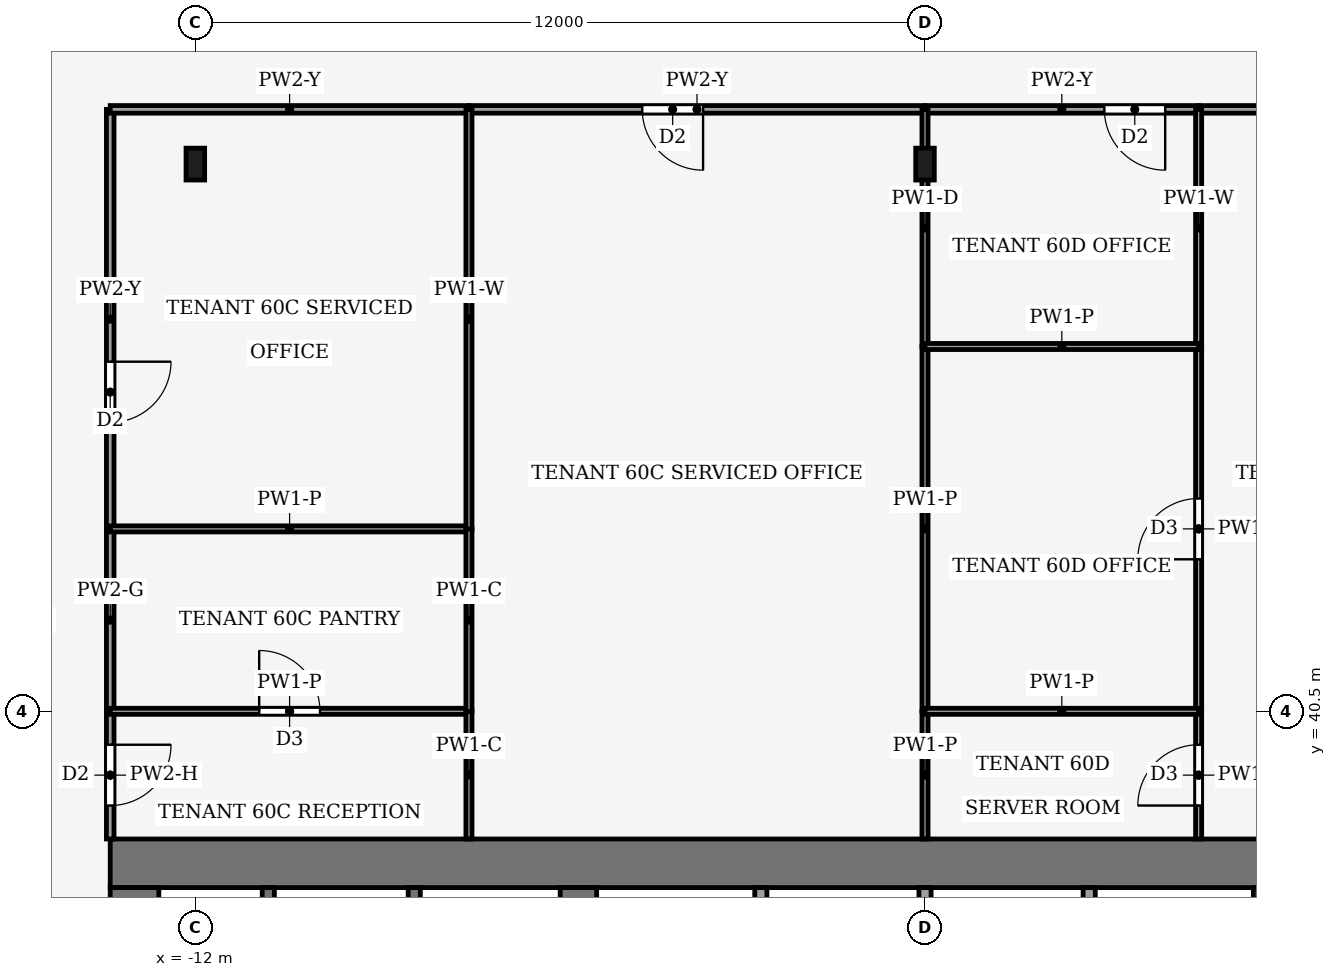
"""IFC4 building model, lengths in metres.
Left out: names, types, materials, properties, quantities, classifications, styles, units other than length and angle.
Written with IfcOpenShell. Run it as: python <this file> out.ifc"""

import sys

from ifc_helpers import new_model, si_unit, direction, frame, frame_2d, origin, origin_2d, place, context, subcontext, project, spatial, rectangle, i_section, extrude, element, fill, save


model = new_model("IFC4")
c1 = context("Model", 3, precision=1e-05, world=origin(), true_north=direction((0.0, 1.0)))
c2 = subcontext(c1, "Body", "Model", "MODEL_VIEW")
j1 = project(units=[si_unit("LENGTHUNIT", "METRE"), si_unit("PLANEANGLEUNIT", "RADIAN")], contexts=[c1])
p1 = place(None, origin())
s1 = spatial("IfcSite", under=j1, at=p1, CompositionType="ELEMENT")
p2 = place(p1, origin())
s2 = spatial("IfcBuilding", under=s1, at=p2, CompositionType="ELEMENT")
p3 = place(p2, frame((0.0, 0.0, 262.0)))
s3 = spatial("IfcBuildingStorey", under=s2, at=p3, CompositionType="ELEMENT", Elevation=262.0)
p4 = place(p3, frame((-13.4, 38.0, -0.13), z_axis=(0.0, 0.0, 1.0), x_axis=(1.0, 0.0, 0.0)))
e1 = element("IfcWall", 1, at=p4, inside=s3, PredefinedType="SHEAR", context=c2, shape_type="SweptSolid", body=[
    extrude(rectangle(XDim=26.8, YDim=0.8, at=frame_2d((13.4, 0.0))), origin(), (0.0, 0.0, 1.0), 4.0),
])
p5 = place(p3, frame((-13.0, 18.4, -0.13), z_axis=(0.0, 0.0, 1.0), x_axis=(0.0, 1.0, 0.0)))
e2 = element("IfcWall", 2, at=p5, inside=s3, PredefinedType="SHEAR", context=c2, shape_type="SweptSolid", body=[
    extrude(rectangle(XDim=19.2, YDim=0.8, at=frame_2d((9.6, 0.0))), origin(), (0.0, 0.0, 1.0), 4.0),
])
p6 = place(p5, frame((2.8, 0.0, 0.13)))
e3 = element("IfcOpeningElement", 3, at=p6, cuts=e2, PredefinedType="OPENING", context=c2, shape_type="SweptSolid", body=[
    extrude(rectangle(XDim=2.4, YDim=2.4, at=frame_2d((1.2, 1.2))), frame((0.0, 0.41, 0.0), z_axis=(0.0, -1.0, 0.0), x_axis=(1.0, 0.0, 0.0)), (0.0, 0.0, 1.0), 0.82),
])
p7 = place(p5, frame((13.4, 0.0, 0.13)))
e4 = element("IfcOpeningElement", 4, at=p7, cuts=e2, PredefinedType="OPENING", context=c2, shape_type="SweptSolid", body=[
    extrude(rectangle(XDim=1.4, YDim=2.2, at=frame_2d((0.7, 1.1))), frame((0.0, 0.41, 0.0), z_axis=(0.0, -1.0, 0.0), x_axis=(1.0, 0.0, 0.0)), (0.0, 0.0, 1.0), 0.82),
])
p8 = place(p3, frame((-5.7, 18.4, -0.13), z_axis=(0.0, 0.0, 1.0), x_axis=(0.0, 1.0, 0.0)))
e5 = element("IfcWall", 5, at=p8, inside=s3, PredefinedType="SHEAR", context=c2, shape_type="SweptSolid", body=[
    extrude(rectangle(XDim=19.2, YDim=0.6, at=frame_2d((9.6, 0.0))), origin(), (0.0, 0.0, 1.0), 4.0),
])
p9 = place(p8, frame((8.35, 0.0, 0.13)))
e6 = element("IfcOpeningElement", 6, at=p9, cuts=e5, PredefinedType="OPENING", context=c2, shape_type="SweptSolid", body=[
    extrude(rectangle(XDim=0.9, YDim=2.1, at=frame_2d((0.45, 1.05))), frame((0.0, 0.31, 0.0), z_axis=(0.0, -1.0, 0.0), x_axis=(1.0, 0.0, 0.0)), (0.0, 0.0, 1.0), 0.62),
])
p10 = place(p3, frame((5.7, 18.4, -0.13), z_axis=(0.0, 0.0, 1.0), x_axis=(0.0, 1.0, 0.0)))
e7 = element("IfcWall", 7, at=p10, inside=s3, PredefinedType="SHEAR", context=c2, shape_type="SweptSolid", body=[
    extrude(rectangle(XDim=19.2, YDim=0.6, at=frame_2d((9.6, 0.0))), origin(), (0.0, 0.0, 1.0), 4.0),
])
p11 = place(p10, frame((8.35, 0.0, 0.13)))
e8 = element("IfcOpeningElement", 8, at=p11, cuts=e7, PredefinedType="OPENING", context=c2, shape_type="SweptSolid", body=[
    extrude(rectangle(XDim=0.9, YDim=2.1, at=frame_2d((0.45, 1.05))), frame((0.0, 0.31, 0.0), z_axis=(0.0, -1.0, 0.0), x_axis=(1.0, 0.0, 0.0)), (0.0, 0.0, 1.0), 0.62),
])
p12 = place(p10, frame((13.3, 0.0, 0.13)))
e9 = element("IfcOpeningElement", 9, at=p12, cuts=e7, PredefinedType="OPENING", context=c2, shape_type="SweptSolid", body=[
    extrude(rectangle(XDim=2.4, YDim=2.4, at=frame_2d((1.2, 1.2))), frame((0.0, 0.31, 0.0), z_axis=(0.0, -1.0, 0.0), x_axis=(1.0, 0.0, 0.0)), (0.0, 0.0, 1.0), 0.62),
])
for number, where, z_axis, x_axis in (
    (10, (-12.0, 49.5, 0.0), (0.0, 0.0, 1.0), (1.0, 0.0, 0.0)),
    (11, (0.0, 49.5, 0.0), (0.0, 0.0, 1.0), (1.0, 0.0, 0.0)),
):
    element("IfcColumn", number, at=place(p3, frame(where, z_axis=z_axis, x_axis=x_axis)), inside=s3, PredefinedType="COLUMN", context=c2, shape_type="SweptSolid", body=[
        extrude(i_section(OverallWidth=0.306, OverallDepth=0.524, WebThickness=0.012, FlangeThickness=0.04, FilletRadius=0.027, at=origin_2d()), origin(), (0.0, 0.0, 1.0), 4.0),
    ])
for number, where, z_axis, x_axis in (
    (12, (-10.8, 34.0, 0.0), (0.0, 0.0, 1.0), (0.0, 1.0, 0.0)),
    (13, (-8.4, 34.0, 0.0), (0.0, 0.0, 1.0), (0.0, 1.0, 0.0)),
    (14, (-2.7, 34.0, 0.0), (0.0, 0.0, 1.0), (0.0, 1.0, 0.0)),
    (15, (0.0, 34.0, 0.0), (0.0, 0.0, 1.0), (0.0, 1.0, 0.0)),
    (16, (2.7, 34.0, 0.0), (0.0, 0.0, 1.0), (0.0, 1.0, 0.0)),
):
    element("IfcWall", number, at=place(p3, frame(where, z_axis=z_axis, x_axis=x_axis)), inside=s3, PredefinedType="PARTITIONING", context=c2, shape_type="SweptSolid", body=[
        extrude(rectangle(XDim=3.6, YDim=0.2, at=frame_2d((1.8, 0.0))), origin(), (0.0, 0.0, 1.0), 3.87),
    ])
p13 = place(p3, frame((-13.4, 40.5, 0.0), z_axis=(0.0, 0.0, 1.0), x_axis=(0.0, -1.0, 0.0)))
e17 = element("IfcWall", 17, at=p13, inside=s3, PredefinedType="PARTITIONING", context=c2, shape_type="SweptSolid", body=[
    extrude(rectangle(XDim=2.1, YDim=0.125, at=frame_2d((1.05, 0.0))), origin(), (0.0, 0.0, 1.0), 3.14),
])
p14 = place(p13, frame((0.55, 0.0, 0.0)))
e18 = element("IfcOpeningElement", 18, at=p14, cuts=e17, PredefinedType="OPENING", context=c2, shape_type="SweptSolid", body=[
    extrude(rectangle(XDim=1.0, YDim=2.1, at=frame_2d((0.5, 1.05))), frame((0.0, 0.073, 0.0), z_axis=(0.0, -1.0, 0.0), x_axis=(1.0, 0.0, 0.0)), (0.0, 0.0, 1.0), 0.145),
])
p15 = place(p3, frame((-13.4, 40.5, 0.0), z_axis=(0.0, 0.0, 1.0), x_axis=(0.0, 1.0, 0.0)))
e19 = element("IfcWall", 19, at=p15, inside=s3, PredefinedType="PARTITIONING", context=c2, shape_type="SweptSolid", body=[
    extrude(rectangle(XDim=3.0, YDim=0.125, at=frame_2d((1.5, 0.0))), origin(), (0.0, 0.0, 1.0), 3.87),
])
p16 = place(p3, frame((-13.4, 50.4, 0.0), z_axis=(0.0, 0.0, 1.0), x_axis=(0.0, -1.0, 0.0)))
e20 = element("IfcWall", 20, at=p16, inside=s3, PredefinedType="PARTITIONING", context=c2, shape_type="SweptSolid", body=[
    extrude(rectangle(XDim=6.9, YDim=0.125, at=frame_2d((3.45, 0.0))), origin(), (0.0, 0.0, 1.0), 3.24),
])
p17 = place(p16, frame((4.15, 0.0, 0.0)))
e21 = element("IfcOpeningElement", 21, at=p17, cuts=e20, PredefinedType="OPENING", context=c2, shape_type="SweptSolid", body=[
    extrude(rectangle(XDim=1.0, YDim=2.1, at=frame_2d((0.5, 1.05))), frame((0.0, 0.073, 0.0), z_axis=(0.0, -1.0, 0.0), x_axis=(1.0, 0.0, 0.0)), (0.0, 0.0, 1.0), 0.145),
])
p18 = place(p3, frame((-7.5, 50.4, 0.0), z_axis=(0.0, 0.0, 1.0), x_axis=(-1.0, 0.0, 0.0)))
e22 = element("IfcWall", 22, at=p18, inside=s3, PredefinedType="PARTITIONING", context=c2, shape_type="SweptSolid", body=[
    extrude(rectangle(XDim=5.9, YDim=0.125, at=frame_2d((2.95, 0.0))), origin(), (0.0, 0.0, 1.0), 3.24),
])
p19 = place(p3, frame((0.0, 50.4, 0.0), z_axis=(0.0, 0.0, 1.0), x_axis=(-1.0, 0.0, 0.0)))
e23 = element("IfcWall", 23, at=p19, inside=s3, PredefinedType="PARTITIONING", context=c2, shape_type="SweptSolid", body=[
    extrude(rectangle(XDim=7.5, YDim=0.125, at=frame_2d((3.75, 0.0))), origin(), (0.0, 0.0, 1.0), 3.24),
])
p20 = place(p19, frame((3.65, 0.0, 0.0)))
e24 = element("IfcOpeningElement", 24, at=p20, cuts=e23, PredefinedType="OPENING", context=c2, shape_type="SweptSolid", body=[
    extrude(rectangle(XDim=1.0, YDim=2.1, at=frame_2d((0.5, 1.05))), frame((0.0, 0.073, 0.0), z_axis=(0.0, -1.0, 0.0), x_axis=(1.0, 0.0, 0.0)), (0.0, 0.0, 1.0), 0.145),
])
p21 = place(p3, frame((10.4, 50.4, 0.0), z_axis=(0.0, 0.0, 1.0), x_axis=(-1.0, 0.0, 0.0)))
e25 = element("IfcWall", 25, at=p21, inside=s3, PredefinedType="PARTITIONING", context=c2, shape_type="SweptSolid", body=[
    extrude(rectangle(XDim=5.9, YDim=0.125, at=frame_2d((2.95, 0.0))), origin(), (0.0, 0.0, 1.0), 3.24),
])
p22 = place(p21, frame((2.45, 0.0, 0.0)))
e26 = element("IfcOpeningElement", 26, at=p22, cuts=e25, PredefinedType="OPENING", context=c2, shape_type="SweptSolid", body=[
    extrude(rectangle(XDim=1.0, YDim=2.1, at=frame_2d((0.5, 1.05))), frame((0.0, 0.073, 0.0), z_axis=(0.0, -1.0, 0.0), x_axis=(1.0, 0.0, 0.0)), (0.0, 0.0, 1.0), 0.145),
])
p23 = place(p3, frame((4.5, 50.4, 0.0), z_axis=(0.0, 0.0, 1.0), x_axis=(-1.0, 0.0, 0.0)))
e27 = element("IfcWall", 27, at=p23, inside=s3, PredefinedType="PARTITIONING", context=c2, shape_type="SweptSolid", body=[
    extrude(rectangle(XDim=4.5, YDim=0.125, at=frame_2d((2.25, 0.0))), origin(), (0.0, 0.0, 1.0), 3.24),
])
p24 = place(p23, frame((0.55, 0.0, 0.0)))
e28 = element("IfcOpeningElement", 28, at=p24, cuts=e27, PredefinedType="OPENING", context=c2, shape_type="SweptSolid", body=[
    extrude(rectangle(XDim=1.0, YDim=2.1, at=frame_2d((0.5, 1.05))), frame((0.0, 0.073, 0.0), z_axis=(0.0, -1.0, 0.0), x_axis=(1.0, 0.0, 0.0)), (0.0, 0.0, 1.0), 0.145),
])
p25 = place(p3, frame((-13.4, 40.5, 0.0), z_axis=(0.0, 0.0, 1.0), x_axis=(1.0, 0.0, 0.0)))
e29 = element("IfcWall", 29, at=p25, inside=s3, PredefinedType="PARTITIONING", context=c2, shape_type="SweptSolid", body=[
    extrude(rectangle(XDim=5.9, YDim=0.1, at=frame_2d((2.95, 0.0))), origin(), (0.0, 0.0, 1.0), 3.44),
])
p26 = place(p25, frame((2.45, 0.0, 0.0)))
e30 = element("IfcOpeningElement", 30, at=p26, cuts=e29, PredefinedType="OPENING", context=c2, shape_type="SweptSolid", body=[
    extrude(rectangle(XDim=1.0, YDim=2.1, at=frame_2d((0.5, 1.05))), frame((0.0, 0.06, 0.0), z_axis=(0.0, -1.0, 0.0), x_axis=(1.0, 0.0, 0.0)), (0.0, 0.0, 1.0), 0.12),
])
p27 = place(p3, frame((-7.5, 38.4, 0.0), z_axis=(0.0, 0.0, 1.0), x_axis=(0.0, 1.0, 0.0)))
e31 = element("IfcWall", 31, at=p27, inside=s3, PredefinedType="PARTITIONING", context=c2, shape_type="SweptSolid", body=[
    extrude(rectangle(XDim=2.104, YDim=0.1, at=frame_2d((1.052, 0.0))), origin(), (0.0, 0.0, 1.0), 3.87),
])
p28 = place(p3, frame((-7.5, 43.5, 0.0), z_axis=(0.0, 0.0, 1.0), x_axis=(-1.0, 0.0, 0.0)))
e32 = element("IfcWall", 32, at=p28, inside=s3, PredefinedType="PARTITIONING", context=c2, shape_type="SweptSolid", body=[
    extrude(rectangle(XDim=5.9, YDim=0.1, at=frame_2d((2.95, 0.0))), origin(), (0.0, 0.0, 1.0), 3.44),
])
p29 = place(p3, frame((-7.5, 40.496, 0.0), z_axis=(0.0, 0.0, 1.0), x_axis=(0.0, 1.0, 0.0)))
e33 = element("IfcWall", 33, at=p29, inside=s3, PredefinedType="PARTITIONING", context=c2, shape_type="SweptSolid", body=[
    extrude(rectangle(XDim=3.008, YDim=0.1, at=frame_2d((1.504, 0.0))), origin(), (0.0, 0.0, 1.0), 3.87),
])
p30 = place(p3, frame((-7.5, 43.496, 0.0), z_axis=(0.0, 0.0, 1.0), x_axis=(0.0, 1.0, 0.0)))
e34 = element("IfcWall", 34, at=p30, inside=s3, PredefinedType="PARTITIONING", context=c2, shape_type="SweptSolid", body=[
    extrude(rectangle(XDim=6.904, YDim=0.1, at=frame_2d((3.452, 0.0))), origin(), (0.0, 0.0, 1.0), 3.24),
])
p31 = place(p3, frame((0.0, 38.4, 0.0), z_axis=(0.0, 0.0, 1.0), x_axis=(0.0, 1.0, 0.0)))
e35 = element("IfcWall", 35, at=p31, inside=s3, PredefinedType="PARTITIONING", context=c2, shape_type="SweptSolid", body=[
    extrude(rectangle(XDim=2.1, YDim=0.1, at=frame_2d((1.05, 0.0))), origin(), (0.0, 0.0, 1.0), 3.44),
])
p32 = place(p3, frame((0.0, 40.5, 0.0), z_axis=(0.0, 0.0, 1.0), x_axis=(0.0, 1.0, 0.0)))
e36 = element("IfcWall", 36, at=p32, inside=s3, PredefinedType="PARTITIONING", context=c2, shape_type="SweptSolid", body=[
    extrude(rectangle(XDim=6.0, YDim=0.1, at=frame_2d((3.0, 0.0))), origin(), (0.0, 0.0, 1.0), 3.44),
])
p33 = place(p3, frame((0.0, 46.5, 0.0), z_axis=(0.0, 0.0, 1.0), x_axis=(0.0, 1.0, 0.0)))
e37 = element("IfcWall", 37, at=p33, inside=s3, PredefinedType="PARTITIONING", context=c2, shape_type="SweptSolid", body=[
    extrude(rectangle(XDim=3.9, YDim=0.1, at=frame_2d((1.95, 0.0))), origin(), (0.0, 0.0, 1.0), 3.29),
])
p34 = place(p3, frame((4.5, 38.4, 0.0), z_axis=(0.0, 0.0, 1.0), x_axis=(0.0, 1.0, 0.0)))
e38 = element("IfcWall", 38, at=p34, inside=s3, PredefinedType="PARTITIONING", context=c2, shape_type="SweptSolid", body=[
    extrude(rectangle(XDim=2.1, YDim=0.1, at=frame_2d((1.05, 0.0))), origin(), (0.0, 0.0, 1.0), 3.87),
])
p35 = place(p34, frame((0.55, 0.0, 0.0)))
e39 = element("IfcOpeningElement", 39, at=p35, cuts=e38, PredefinedType="OPENING", context=c2, shape_type="SweptSolid", body=[
    extrude(rectangle(XDim=1.0, YDim=2.1, at=frame_2d((0.5, 1.05))), frame((0.0, 0.06, 0.0), z_axis=(0.0, -1.0, 0.0), x_axis=(1.0, 0.0, 0.0)), (0.0, 0.0, 1.0), 0.12),
])
p36 = place(p3, frame((4.5, 40.5, 0.0), z_axis=(0.0, 0.0, 1.0), x_axis=(0.0, 1.0, 0.0)))
e40 = element("IfcWall", 40, at=p36, inside=s3, PredefinedType="PARTITIONING", context=c2, shape_type="SweptSolid", body=[
    extrude(rectangle(XDim=6.0, YDim=0.1, at=frame_2d((3.0, 0.0))), origin(), (0.0, 0.0, 1.0), 3.87),
])
p37 = place(p36, frame((2.5, 0.0, 0.0)))
e41 = element("IfcOpeningElement", 41, at=p37, cuts=e40, PredefinedType="OPENING", context=c2, shape_type="SweptSolid", body=[
    extrude(rectangle(XDim=1.0, YDim=2.1, at=frame_2d((0.5, 1.05))), frame((0.0, 0.06, 0.0), z_axis=(0.0, -1.0, 0.0), x_axis=(1.0, 0.0, 0.0)), (0.0, 0.0, 1.0), 0.12),
])
p38 = place(p3, frame((4.5, 50.4, 0.0), z_axis=(0.0, 0.0, 1.0), x_axis=(0.0, -1.0, 0.0)))
e42 = element("IfcWall", 42, at=p38, inside=s3, PredefinedType="PARTITIONING", context=c2, shape_type="SweptSolid", body=[
    extrude(rectangle(XDim=3.9, YDim=0.1, at=frame_2d((1.95, 0.0))), origin(), (0.0, 0.0, 1.0), 3.24),
])
for number, where, z_axis, x_axis in (
    (43, (4.5, 40.5, 0.0), (0.0, 0.0, 1.0), (-1.0, 0.0, 0.0)),
    (44, (4.5, 46.5, 0.0), (0.0, 0.0, 1.0), (-1.0, 0.0, 0.0)),
):
    element("IfcWall", number, at=place(p3, frame(where, z_axis=z_axis, x_axis=x_axis)), inside=s3, PredefinedType="PARTITIONING", context=c2, shape_type="SweptSolid", body=[
        extrude(rectangle(XDim=4.5, YDim=0.1, at=frame_2d((2.25, 0.0))), origin(), (0.0, 0.0, 1.0), 3.44),
    ])
p39 = place(p14, origin())
e45 = element("IfcDoor", 45, at=p39, inside=s3, OperationType="SINGLE_SWING_RIGHT", PredefinedType="DOOR", context=c2, shape_type="SweptSolid", body=[
    extrude(rectangle(XDim=1.0, YDim=2.1, at=frame_2d((0.5, 1.05))), frame((0.0, 0.025, 0.0), z_axis=(0.0, -1.0, 0.0), x_axis=(1.0, 0.0, 0.0)), (0.0, 0.0, 1.0), 0.05),
])
fill(e18, e45)
p40 = place(p17, origin())
e46 = element("IfcDoor", 46, at=p40, inside=s3, OperationType="SINGLE_SWING_RIGHT", PredefinedType="DOOR", context=c2, shape_type="SweptSolid", body=[
    extrude(rectangle(XDim=1.0, YDim=2.1, at=frame_2d((0.5, 1.05))), frame((0.0, 0.025, 0.0), z_axis=(0.0, -1.0, 0.0), x_axis=(1.0, 0.0, 0.0)), (0.0, 0.0, 1.0), 0.05),
])
fill(e21, e46)
p41 = place(p20, origin())
e47 = element("IfcDoor", 47, at=p41, inside=s3, OperationType="SINGLE_SWING_RIGHT", PredefinedType="DOOR", context=c2, shape_type="SweptSolid", body=[
    extrude(rectangle(XDim=1.0, YDim=2.1, at=frame_2d((0.5, 1.05))), frame((0.0, 0.025, 0.0), z_axis=(0.0, -1.0, 0.0), x_axis=(1.0, 0.0, 0.0)), (0.0, 0.0, 1.0), 0.05),
])
fill(e24, e47)
p42 = place(p24, origin())
e48 = element("IfcDoor", 48, at=p42, inside=s3, OperationType="SINGLE_SWING_LEFT", PredefinedType="DOOR", context=c2, shape_type="SweptSolid", body=[
    extrude(rectangle(XDim=1.0, YDim=2.1, at=frame_2d((0.5, 1.05))), frame((0.0, 0.025, 0.0), z_axis=(0.0, -1.0, 0.0), x_axis=(1.0, 0.0, 0.0)), (0.0, 0.0, 1.0), 0.05),
])
fill(e28, e48)
p43 = place(p26, origin())
e49 = element("IfcDoor", 49, at=p43, inside=s3, OperationType="SINGLE_SWING_LEFT", PredefinedType="DOOR", context=c2, shape_type="SweptSolid", body=[
    extrude(rectangle(XDim=1.0, YDim=2.1, at=frame_2d((0.5, 1.05))), frame((0.0, 0.025, 0.0), z_axis=(0.0, -1.0, 0.0), x_axis=(1.0, 0.0, 0.0)), (0.0, 0.0, 1.0), 0.05),
])
fill(e30, e49)
p44 = place(p35, origin())
e50 = element("IfcDoor", 50, at=p44, inside=s3, OperationType="SINGLE_SWING_RIGHT", PredefinedType="DOOR", context=c2, shape_type="SweptSolid", body=[
    extrude(rectangle(XDim=1.0, YDim=2.1, at=frame_2d((0.5, 1.05))), frame((0.0, 0.025, 0.0), z_axis=(0.0, -1.0, 0.0), x_axis=(1.0, 0.0, 0.0)), (0.0, 0.0, 1.0), 0.05),
])
fill(e39, e50)
p45 = place(p37, origin())
e51 = element("IfcDoor", 51, at=p45, inside=s3, OperationType="SINGLE_SWING_LEFT", PredefinedType="DOOR", context=c2, shape_type="SweptSolid", body=[
    extrude(rectangle(XDim=1.0, YDim=2.1, at=frame_2d((0.5, 1.05))), frame((0.0, 0.025, 0.0), z_axis=(0.0, -1.0, 0.0), x_axis=(1.0, 0.0, 0.0)), (0.0, 0.0, 1.0), 0.05),
])
fill(e41, e51)
save(model, sys.argv[1])
